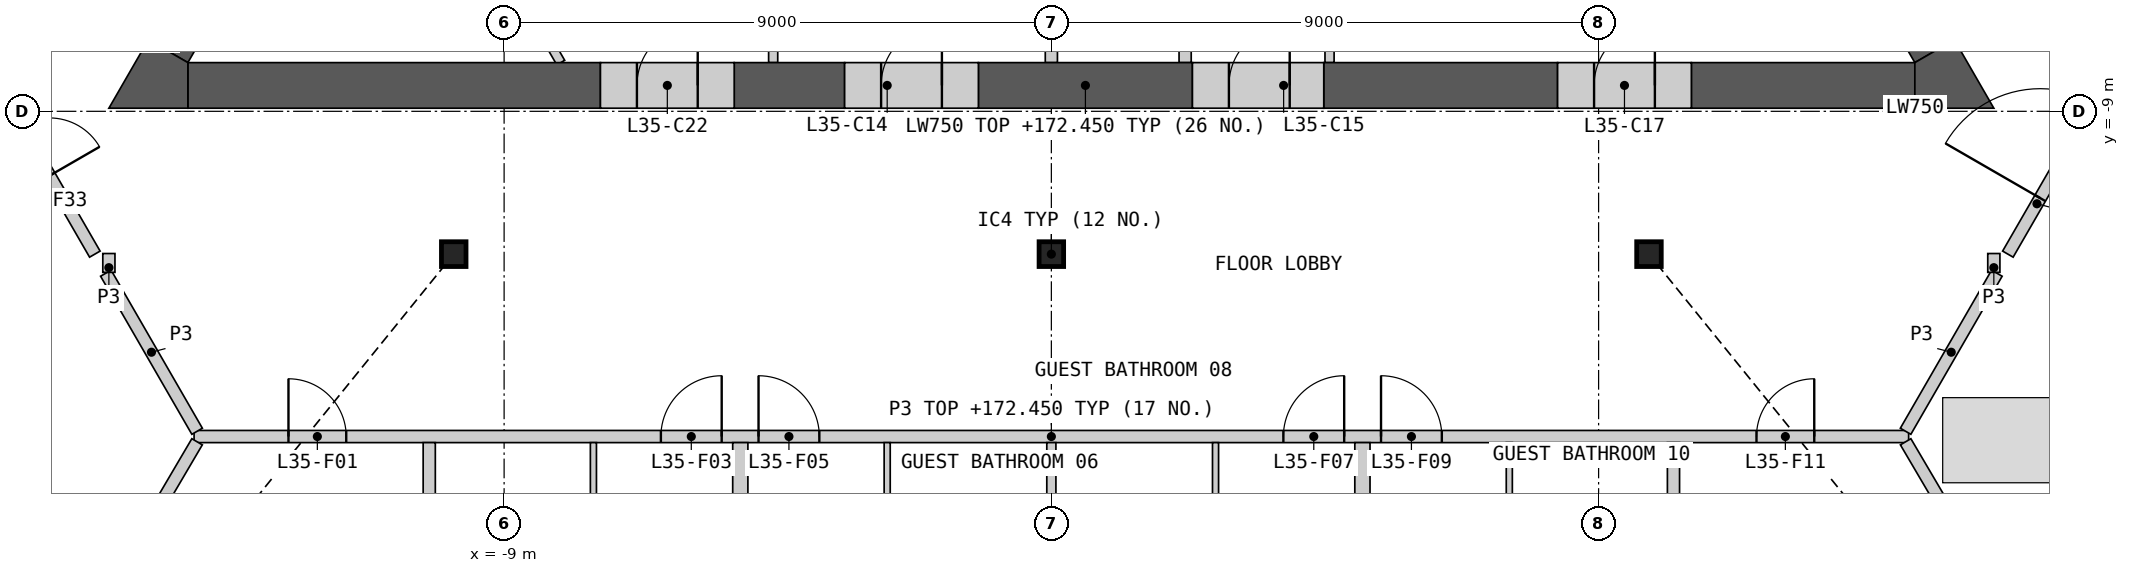
"""IFC4 building model, lengths in metres.
Left out: names, types, materials, properties, quantities, classifications, styles, units other than length and angle.
Written with IfcOpenShell. Run it as: python <this file> out.ifc"""

import sys

from ifc_helpers import new_model, si_unit, direction, frame, frame_2d, origin, origin_2d, place, context, subcontext, project, spatial, polyline, rectangle, i_section, outline, extrude, element, fill, save


model = new_model("IFC4")
c1 = context("Model", 3, precision=1e-05, world=origin(), true_north=direction((0.0, 1.0)))
c2 = subcontext(c1, "Body", "Model", "MODEL_VIEW")
j1 = project(units=[si_unit("LENGTHUNIT", "METRE"), si_unit("PLANEANGLEUNIT", "RADIAN")], contexts=[c1])
p1 = place(None, origin())
s1 = spatial("IfcSite", under=j1, at=p1, CompositionType="ELEMENT")
p2 = place(p1, origin())
s2 = spatial("IfcBuilding", under=s1, at=p2, CompositionType="ELEMENT")
p3 = place(p2, frame((0.0, 0.0, 169.2)))
s3 = spatial("IfcBuildingStorey", under=s2, at=p3, CompositionType="ELEMENT", Elevation=169.2)
for number, where, z_axis, x_axis in (
    (1, (-9.828, -11.349, 0.0), (0.0, 0.0, 1.0), (1.0, 0.0, 0.0)),
    (2, (0.0, -11.349, 0.0), (0.0, 0.0, 1.0), (1.0, 0.0, 0.0)),
    (3, (9.828, -11.349, 0.0), (0.0, 0.0, 1.0), (1.0, 0.0, 0.0)),
):
    element("IfcColumn", number, at=place(p3, frame(where, z_axis=z_axis, x_axis=x_axis)), inside=s3, PredefinedType="COLUMN", context=c2, shape_type="SweptSolid", body=[
        extrude(i_section(OverallWidth=0.404, OverallDepth=0.407, WebThickness=0.027, FlangeThickness=0.044, at=origin_2d()), origin(), (0.0, 0.0, 1.0), 3.6),
    ])
for number, where, z_axis, x_axis in (
    (4, (0.0, -6.906, 0.0), (0.0, 0.0, 1.0), (0.0, -1.0, 0.0)),
    (5, (2.2, -6.906, 0.0), (0.0, 0.0, 1.0), (0.0, -1.0, 0.0)),
):
    element("IfcWall", number, at=place(p3, frame(where, z_axis=z_axis, x_axis=x_axis)), inside=s3, PredefinedType="SHEAR", context=c2, shape_type="SweptSolid", body=[
        extrude(rectangle(XDim=1.293, YDim=0.2, at=frame_2d((0.646, 0.0))), origin(), (0.0, 0.0, 1.0), 3.25),
    ])
for number, where, z_axis, x_axis in (
    (6, (4.575, -6.906, 0.0), (0.0, 0.0, 1.0), (0.0, -1.0, 0.0)),
    (7, (-4.575, -6.906, 0.0), (0.0, 0.0, 1.0), (0.0, -1.0, 0.0)),
):
    element("IfcWall", number, at=place(p3, frame(where, z_axis=z_axis, x_axis=x_axis)), inside=s3, PredefinedType="PARTITIONING", context=c2, shape_type="SweptSolid", body=[
        extrude(rectangle(XDim=1.293, YDim=0.15, at=frame_2d((0.646, 0.0))), origin(), (0.0, 0.0, 1.0), 3.25),
    ])
p4 = place(p3, frame((-8.83, -6.881, 0.0), z_axis=(0.0, 0.0, 1.0), x_axis=(0.500037110984, -0.866003976688, 0.0)))
e8 = element("IfcWall", 8, at=p4, inside=s3, PredefinedType="PARTITIONING", context=c2, shape_type="SweptSolid", body=[
    extrude(rectangle(XDim=1.522, YDim=0.15, at=frame_2d((0.761, 0.0))), origin(), (0.0, 0.0, 1.0), 3.25),
])
p5 = place(p3, frame((-14.201, -8.574, 0.0), z_axis=(0.0, 0.0, 1.0), x_axis=(1.0, 0.0, 0.0)))
e9 = element("IfcWall", 9, at=p5, inside=s3, PredefinedType="SHEAR", context=c2, shape_type="SweptSolid", body=[
    extrude(rectangle(XDim=6.785, YDim=0.75, at=frame_2d((3.393, 0.0))), origin(), (0.0, 0.0, 1.0), 3.25),
])
p6 = place(p3, frame((4.48, -8.574, 0.0), z_axis=(0.0, 0.0, 1.0), x_axis=(1.0, 0.0, 0.0)))
e10 = element("IfcWall", 10, at=p6, inside=s3, PredefinedType="SHEAR", context=c2, shape_type="SweptSolid", body=[
    extrude(rectangle(XDim=3.845, YDim=0.75, at=frame_2d((1.923, 0.0))), origin(), (0.0, 0.0, 1.0), 3.25),
])
p7 = place(p3, frame((10.525, -8.574, 0.0), z_axis=(0.0, 0.0, 1.0), x_axis=(1.0, 0.0, 0.0)))
e11 = element("IfcWall", 11, at=p7, inside=s3, PredefinedType="SHEAR", context=c2, shape_type="SweptSolid", body=[
    extrude(rectangle(XDim=3.676, YDim=0.75, at=frame_2d((1.838, 0.0))), origin(), (0.0, 0.0, 1.0), 3.25),
])
p8 = place(p3, frame((-1.2, -8.574, 0.0), z_axis=(0.0, 0.0, 1.0), x_axis=(1.0, 0.0, 0.0)))
e12 = element("IfcWall", 12, at=p8, inside=s3, PredefinedType="SHEAR", context=c2, shape_type="SweptSolid", body=[
    extrude(rectangle(XDim=3.52, YDim=0.75, at=frame_2d((1.76, 0.0))), origin(), (0.0, 0.0, 1.0), 3.25),
])
p9 = place(p3, frame((-5.216, -8.574, 0.0), z_axis=(0.0, 0.0, 1.0), x_axis=(1.0, 0.0, 0.0)))
e13 = element("IfcWall", 13, at=p9, inside=s3, PredefinedType="SHEAR", context=c2, shape_type="SweptSolid", body=[
    extrude(rectangle(XDim=1.816, YDim=0.75, at=frame_2d((0.908, 0.0))), origin(), (0.0, 0.0, 1.0), 3.25),
])
p10 = place(p3, frame((14.526, -8.011, 0.0), z_axis=(0.0, 0.0, 1.0), x_axis=(-0.499994855372, 0.866028374016, 0.0)))
e14 = element("IfcWall", 14, at=p10, inside=s3, PredefinedType="SHEAR", context=c2, shape_type="SweptSolid", body=[
    extrude(rectangle(XDim=14.301, YDim=0.75, at=frame_2d((7.15, 0.0))), origin(), (0.0, 0.0, 1.0), 3.25),
])
p11 = place(p3, frame((-13.564, -6.346, 0.0), z_axis=(0.0, 0.0, 1.0), x_axis=(-0.499989888488, -0.86603124159, 0.0)))
e15 = element("IfcWall", 15, at=p11, inside=s3, PredefinedType="SHEAR", context=c2, shape_type="SweptSolid", body=[
    extrude(rectangle(XDim=1.923, YDim=0.75, at=frame_2d((0.961, 0.0))), origin(), (0.0, 0.0, 1.0), 3.25),
])
p12 = place(p3, origin())
e16 = element("IfcWall", 16, at=p12, inside=s3, PredefinedType="SHEAR", context=c2, shape_type="SweptSolid", body=[
    extrude(outline(polyline([(14.201, -8.949), (14.201, -8.199), (14.851, -7.824), (15.5, -8.949), (14.201, -8.949)])), origin(), (0.0, 0.0, 1.0), 3.25),
])
p13 = place(p3, origin())
e17 = element("IfcWall", 17, at=p13, inside=s3, PredefinedType="SHEAR", context=c2, shape_type="SweptSolid", body=[
    extrude(outline(polyline([(-14.851, -7.824), (-14.201, -8.199), (-14.201, -8.949), (-15.5, -8.949), (-14.851, -7.824)])), origin(), (0.0, 0.0, 1.0), 3.25),
])
p14 = place(p3, frame((-3.4, -8.574, 0.0), z_axis=(0.0, 0.0, 1.0), x_axis=(1.0, 0.0, 0.0)))
e18 = element("IfcWall", 18, at=p14, inside=s3, PredefinedType="SHEAR", context=c2, shape_type="SweptSolid", body=[
    extrude(rectangle(XDim=2.2, YDim=0.75, at=frame_2d((1.1, 0.0))), origin(), (0.0, 0.0, 1.0), 3.25),
])
p15 = place(p14, frame((0.6, 0.0, 0.0)))
e19 = element("IfcOpeningElement", 19, at=p15, cuts=e18, PredefinedType="OPENING", context=c2, shape_type="SweptSolid", body=[
    extrude(rectangle(XDim=1.0, YDim=2.1, at=frame_2d((0.5, 1.05))), frame((0.0, 0.385, 0.0), z_axis=(0.0, -1.0, 0.0), x_axis=(1.0, 0.0, 0.0)), (0.0, 0.0, 1.0), 0.77),
])
p16 = place(p3, frame((2.32, -8.574, 0.0), z_axis=(0.0, 0.0, 1.0), x_axis=(1.0, 0.0, 0.0)))
e20 = element("IfcWall", 20, at=p16, inside=s3, PredefinedType="SHEAR", context=c2, shape_type="SweptSolid", body=[
    extrude(rectangle(XDim=2.16, YDim=0.75, at=frame_2d((1.08, 0.0))), origin(), (0.0, 0.0, 1.0), 3.25),
])
p17 = place(p16, frame((0.6, 0.0, 0.0)))
e21 = element("IfcOpeningElement", 21, at=p17, cuts=e20, PredefinedType="OPENING", context=c2, shape_type="SweptSolid", body=[
    extrude(rectangle(XDim=1.0, YDim=2.1, at=frame_2d((0.5, 1.05))), frame((0.0, 0.385, 0.0), z_axis=(0.0, -1.0, 0.0), x_axis=(1.0, 0.0, 0.0)), (0.0, 0.0, 1.0), 0.77),
])
p18 = place(p3, frame((8.325, -8.574, 0.0), z_axis=(0.0, 0.0, 1.0), x_axis=(1.0, 0.0, 0.0)))
e22 = element("IfcWall", 22, at=p18, inside=s3, PredefinedType="SHEAR", context=c2, shape_type="SweptSolid", body=[
    extrude(rectangle(XDim=2.2, YDim=0.75, at=frame_2d((1.1, 0.0))), origin(), (0.0, 0.0, 1.0), 3.25),
])
p19 = place(p18, frame((0.6, 0.0, 0.0)))
e23 = element("IfcOpeningElement", 23, at=p19, cuts=e22, PredefinedType="OPENING", context=c2, shape_type="SweptSolid", body=[
    extrude(rectangle(XDim=1.0, YDim=2.1, at=frame_2d((0.5, 1.05))), frame((0.0, 0.385, 0.0), z_axis=(0.0, -1.0, 0.0), x_axis=(1.0, 0.0, 0.0)), (0.0, 0.0, 1.0), 0.77),
])
p20 = place(p3, frame((-7.416, -8.574, 0.0), z_axis=(0.0, 0.0, 1.0), x_axis=(1.0, 0.0, 0.0)))
e24 = element("IfcWall", 24, at=p20, inside=s3, PredefinedType="SHEAR", context=c2, shape_type="SweptSolid", body=[
    extrude(rectangle(XDim=2.2, YDim=0.75, at=frame_2d((1.1, 0.0))), origin(), (0.0, 0.0, 1.0), 3.25),
])
p21 = place(p20, frame((0.6, 0.0, 0.0)))
e25 = element("IfcOpeningElement", 25, at=p21, cuts=e24, PredefinedType="OPENING", context=c2, shape_type="SweptSolid", body=[
    extrude(rectangle(XDim=1.0, YDim=2.1, at=frame_2d((0.5, 1.05))), frame((0.0, 0.385, 0.0), z_axis=(0.0, -1.0, 0.0), x_axis=(1.0, 0.0, 0.0)), (0.0, 0.0, 1.0), 0.77),
])
p22 = place(p3, frame((-14.099, -14.349, 0.0), z_axis=(0.0, 0.0, 1.0), x_axis=(1.0, 0.0, 0.0)))
e26 = element("IfcWall", 26, at=p22, inside=s3, PredefinedType="PARTITIONING", context=c2, shape_type="SweptSolid", body=[
    extrude(rectangle(XDim=28.198, YDim=0.2, at=frame_2d((14.099, 0.0))), origin(), (0.0, 0.0, 1.0), 3.25),
])
p23 = place(p22, frame((1.552, 0.0, 0.0)))
e27 = element("IfcOpeningElement", 27, at=p23, cuts=e26, PredefinedType="OPENING", context=c2, shape_type="SweptSolid", body=[
    extrude(rectangle(XDim=0.95, YDim=2.1, at=frame_2d((0.475, 1.05))), frame((0.0, 0.11, 0.0), z_axis=(0.0, -1.0, 0.0), x_axis=(1.0, 0.0, 0.0)), (0.0, 0.0, 1.0), 0.22),
])
p24 = place(p22, frame((7.677, 0.0, 0.0)))
e28 = element("IfcOpeningElement", 28, at=p24, cuts=e26, PredefinedType="OPENING", context=c2, shape_type="SweptSolid", body=[
    extrude(rectangle(XDim=1.0, YDim=2.1, at=frame_2d((0.5, 1.05))), frame((0.0, 0.11, 0.0), z_axis=(0.0, -1.0, 0.0), x_axis=(1.0, 0.0, 0.0)), (0.0, 0.0, 1.0), 0.22),
])
p25 = place(p22, frame((9.283, 0.0, 0.0)))
e29 = element("IfcOpeningElement", 29, at=p25, cuts=e26, PredefinedType="OPENING", context=c2, shape_type="SweptSolid", body=[
    extrude(rectangle(XDim=1.0, YDim=2.1, at=frame_2d((0.5, 1.05))), frame((0.0, 0.11, 0.0), z_axis=(0.0, -1.0, 0.0), x_axis=(1.0, 0.0, 0.0)), (0.0, 0.0, 1.0), 0.22),
])
p26 = place(p22, frame((17.915, 0.0, 0.0)))
e30 = element("IfcOpeningElement", 30, at=p26, cuts=e26, PredefinedType="OPENING", context=c2, shape_type="SweptSolid", body=[
    extrude(rectangle(XDim=1.0, YDim=2.1, at=frame_2d((0.5, 1.05))), frame((0.0, 0.11, 0.0), z_axis=(0.0, -1.0, 0.0), x_axis=(1.0, 0.0, 0.0)), (0.0, 0.0, 1.0), 0.22),
])
p27 = place(p22, frame((19.521, 0.0, 0.0)))
e31 = element("IfcOpeningElement", 31, at=p27, cuts=e26, PredefinedType="OPENING", context=c2, shape_type="SweptSolid", body=[
    extrude(rectangle(XDim=1.0, YDim=2.1, at=frame_2d((0.5, 1.05))), frame((0.0, 0.11, 0.0), z_axis=(0.0, -1.0, 0.0), x_axis=(1.0, 0.0, 0.0)), (0.0, 0.0, 1.0), 0.22),
])
p28 = place(p22, frame((25.696, 0.0, 0.0)))
e32 = element("IfcOpeningElement", 32, at=p28, cuts=e26, PredefinedType="OPENING", context=c2, shape_type="SweptSolid", body=[
    extrude(rectangle(XDim=0.95, YDim=2.1, at=frame_2d((0.475, 1.05))), frame((0.0, 0.11, 0.0), z_axis=(0.0, -1.0, 0.0), x_axis=(1.0, 0.0, 0.0)), (0.0, 0.0, 1.0), 0.22),
])
p29 = place(p3, frame((-17.744, -8.035, 0.0), z_axis=(0.0, 0.0, 1.0), x_axis=(0.500007607708, 0.866021011428, 0.0)))
e33 = element("IfcWall", 33, at=p29, inside=s3, PredefinedType="PARTITIONING", context=c2, shape_type="SweptSolid", body=[
    extrude(rectangle(XDim=5.484, YDim=0.2, at=frame_2d((2.742, 0.0))), origin(), (0.0, 0.0, 1.0), 3.25),
])
p30 = place(p29, frame((0.352, 0.0, 0.0)))
e34 = element("IfcOpeningElement", 34, at=p30, cuts=e33, PredefinedType="OPENING", context=c2, shape_type="SweptSolid", body=[
    extrude(rectangle(XDim=1.1, YDim=2.1, at=frame_2d((0.55, 1.05))), frame((0.0, 0.11, 0.0), z_axis=(0.0, -1.0, 0.0), x_axis=(1.0, 0.0, 0.0)), (0.0, 0.0, 1.0), 0.22),
])
p31 = place(p3, frame((15.002, -3.286, 0.0), z_axis=(0.0, 0.0, 1.0), x_axis=(0.500007607708, -0.866021011428, 0.0)))
e35 = element("IfcWall", 35, at=p31, inside=s3, PredefinedType="PARTITIONING", context=c2, shape_type="SweptSolid", body=[
    extrude(rectangle(XDim=5.484, YDim=0.2, at=frame_2d((2.742, 0.0))), origin(), (0.0, 0.0, 1.0), 3.25),
])
p32 = place(p31, frame((4.032, 0.0, 0.0)))
e36 = element("IfcOpeningElement", 36, at=p32, cuts=e35, PredefinedType="OPENING", context=c2, shape_type="SweptSolid", body=[
    extrude(rectangle(XDim=1.1, YDim=2.1, at=frame_2d((0.55, 1.05))), frame((0.0, 0.11, 0.0), z_axis=(0.0, -1.0, 0.0), x_axis=(1.0, 0.0, 0.0)), (0.0, 0.0, 1.0), 0.22),
])
for number, where, z_axis, x_axis in (
    (37, (-5.116, -19.661, 0.0), (0.0, 0.0, 1.0), (0.0, 1.0, 0.0)),
    (38, (5.116, -19.661, 0.0), (0.0, 0.0, 1.0), (0.0, 1.0, 0.0)),
):
    element("IfcWall", number, at=place(p3, frame(where, z_axis=z_axis, x_axis=x_axis)), inside=s3, PredefinedType="PARTITIONING", context=c2, shape_type="SweptSolid", body=[
        extrude(rectangle(XDim=5.212, YDim=0.25, at=frame_2d((2.606, 0.0))), origin(), (0.0, 0.0, 1.0), 2.404),
    ])
p33 = place(p3, frame((15.731, -11.349, 0.0), z_axis=(0.0, 0.0, 1.0), x_axis=(0.499961815444, 0.866047448526, 0.0)))
e39 = element("IfcWall", 39, at=p33, inside=s3, PredefinedType="PARTITIONING", context=c2, shape_type="SweptSolid", body=[
    extrude(rectangle(XDim=3.826, YDim=0.2, at=frame_2d((1.913, 0.0))), origin(), (0.0, 0.0, 1.0), 3.25),
])
p34 = place(p33, frame((1.064, 0.0, 0.0)))
e40 = element("IfcOpeningElement", 40, at=p34, cuts=e39, PredefinedType="OPENING", context=c2, shape_type="SweptSolid", body=[
    extrude(rectangle(XDim=1.8, YDim=2.1, at=frame_2d((0.9, 1.05))), frame((0.0, 0.11, 0.0), z_axis=(0.0, -1.0, 0.0), x_axis=(1.0, 0.0, 0.0)), (0.0, 0.0, 1.0), 0.22),
])
p35 = place(p3, frame((-17.644, -8.035, 0.0), z_axis=(0.0, 0.0, 1.0), x_axis=(0.499961815444, -0.866047448526, 0.0)))
e41 = element("IfcWall", 41, at=p35, inside=s3, PredefinedType="PARTITIONING", context=c2, shape_type="SweptSolid", body=[
    extrude(rectangle(XDim=3.826, YDim=0.2, at=frame_2d((1.913, 0.0))), origin(), (0.0, 0.0, 1.0), 3.25),
])
p36 = place(p35, frame((1.386, 0.0, 0.0)))
e42 = element("IfcOpeningElement", 42, at=p36, cuts=e41, PredefinedType="OPENING", context=c2, shape_type="SweptSolid", body=[
    extrude(rectangle(XDim=0.95, YDim=2.1, at=frame_2d((0.475, 1.05))), frame((0.0, 0.11, 0.0), z_axis=(0.0, -1.0, 0.0), x_axis=(1.0, 0.0, 0.0)), (0.0, 0.0, 1.0), 0.22),
])
for number, where, z_axis, x_axis in (
    (43, (14.049, -14.262, 0.0), (0.0, 0.0, 1.0), (0.5, 0.866, 0.0)),
    (44, (-15.55, -11.662, 0.0), (0.0, 0.0, 1.0), (0.5, -0.866, 0.0)),
):
    element("IfcWall", number, at=place(p3, frame(where, z_axis=z_axis, x_axis=x_axis)), inside=s3, PredefinedType="PARTITIONING", context=c2, shape_type="SweptSolid", body=[
        extrude(rectangle(XDim=3.002, YDim=0.2, at=frame_2d((1.501, 0.0))), origin(), (0.0, 0.0, 1.0), 3.25),
    ])
for number, where, z_axis, x_axis in (
    (45, (15.5, -11.649, 0.0), (0.0, 0.0, 1.0), (0.0, 1.0, 0.0)),
    (46, (-15.5, -11.649, 0.0), (0.0, 0.0, 1.0), (0.0, 1.0, 0.0)),
):
    element("IfcWall", number, at=place(p3, frame(where, z_axis=z_axis, x_axis=x_axis)), inside=s3, PredefinedType="PARTITIONING", context=c2, shape_type="SweptSolid", body=[
        extrude(rectangle(XDim=0.31, YDim=0.2, at=frame_2d((0.155, 0.0))), origin(), (0.0, 0.0, 1.0), 3.25),
    ])
p37 = place(p3, frame((14.05, -14.435, 0.0), z_axis=(0.0, 0.0, 1.0), x_axis=(0.50691019554, -0.861998871031, 0.0)))
e47 = element("IfcWall", 47, at=p37, inside=s3, PredefinedType="PARTITIONING", context=c2, shape_type="SweptSolid", body=[
    extrude(rectangle(XDim=12.229, YDim=0.2, at=frame_2d((6.115, 0.0))), origin(), (0.0, 0.0, 1.0), 2.404),
])
p38 = place(p3, frame((-20.046, -24.632, 0.0), z_axis=(0.0, 0.0, 1.0), x_axis=(0.50691549935, 0.86199575203, 0.0)))
e48 = element("IfcWall", 48, at=p38, inside=s3, PredefinedType="PARTITIONING", context=c2, shape_type="SweptSolid", body=[
    extrude(rectangle(XDim=11.83, YDim=0.2, at=frame_2d((5.915, 0.0))), origin(), (0.0, 0.0, 1.0), 2.404),
])
p39 = place(p3, frame((-22.363, -7.862, 0.0), z_axis=(0.0, 0.0, 1.0), x_axis=(0.500009728207, -0.866019787128, 0.0)))
e49 = element("IfcWall", 49, at=p39, inside=s3, PredefinedType="PARTITIONING", context=c2, shape_type="SweptSolid", body=[
    extrude(rectangle(XDim=11.967, YDim=0.2, at=frame_2d((5.983, 0.0))), origin(), (0.0, 0.0, 1.0), 2.404),
])
p40 = place(p39, frame((5.658, 0.0, 0.0)))
e50 = element("IfcOpeningElement", 50, at=p40, cuts=e49, PredefinedType="OPENING", context=c2, shape_type="SweptSolid", body=[
    extrude(rectangle(XDim=0.95, YDim=2.1, at=frame_2d((0.475, 1.05))), frame((0.0, 0.11, 0.0), z_axis=(0.0, -1.0, 0.0), x_axis=(1.0, 0.0, 0.0)), (0.0, 0.0, 1.0), 0.22),
])
for number, where, z_axis, x_axis in (
    (51, (-10.231, -24.312, 0.0), (0.0, 0.0, 1.0), (0.0, 1.0, 0.0)),
    (52, (10.231, -24.312, 0.0), (0.0, 0.0, 1.0), (0.0, 1.0, 0.0)),
):
    element("IfcWall", number, at=place(p3, frame(where, z_axis=z_axis, x_axis=x_axis)), inside=s3, PredefinedType="PARTITIONING", context=c2, shape_type="SweptSolid", body=[
        extrude(rectangle(XDim=9.863, YDim=0.2, at=frame_2d((4.931, 0.0))), origin(), (0.0, 0.0, 1.0), 2.404),
    ])
p41 = place(p3, frame((0.0, -16.899, 0.0), z_axis=(0.0, 0.0, 1.0), x_axis=(0.0, 1.0, 0.0)))
e53 = element("IfcWall", 53, at=p41, inside=s3, PredefinedType="PLUMBINGWALL", context=c2, shape_type="SweptSolid", body=[
    extrude(rectangle(XDim=2.45, YDim=0.15, at=frame_2d((1.225, 0.0))), origin(), (0.0, 0.0, 1.0), 2.404),
])
for number, where, z_axis, x_axis in (
    (54, (-7.531, -16.899, 0.0), (0.0, 0.0, 1.0), (0.0, 1.0, 0.0)),
    (55, (-2.7, -16.899, 0.0), (0.0, 0.0, 1.0), (0.0, 1.0, 0.0)),
    (56, (2.7, -16.899, 0.0), (0.0, 0.0, 1.0), (0.0, 1.0, 0.0)),
    (57, (7.531, -16.899, 0.0), (0.0, 0.0, 1.0), (0.0, 1.0, 0.0)),
):
    element("IfcWall", number, at=place(p3, frame(where, z_axis=z_axis, x_axis=x_axis)), inside=s3, PredefinedType="PARTITIONING", context=c2, shape_type="SweptSolid", body=[
        extrude(rectangle(XDim=2.45, YDim=0.1, at=frame_2d((1.225, 0.0))), origin(), (0.0, 0.0, 1.0), 2.404),
    ])
p42 = place(p15, origin())
e58 = element("IfcDoor", 58, at=p42, inside=s3, OperationType="SINGLE_SWING_RIGHT", PredefinedType="DOOR", context=c2, shape_type="SweptSolid", body=[
    extrude(rectangle(XDim=1.0, YDim=2.1, at=frame_2d((0.5, 1.05))), frame((0.0, 0.13, 0.0), z_axis=(0.0, -1.0, 0.0), x_axis=(1.0, 0.0, 0.0)), (0.0, 0.0, 1.0), 0.05),
])
fill(e19, e58)
p43 = place(p17, origin())
e59 = element("IfcDoor", 59, at=p43, inside=s3, OperationType="SINGLE_SWING_RIGHT", PredefinedType="DOOR", context=c2, shape_type="SweptSolid", body=[
    extrude(rectangle(XDim=1.0, YDim=2.1, at=frame_2d((0.5, 1.05))), frame((0.0, 0.13, 0.0), z_axis=(0.0, -1.0, 0.0), x_axis=(1.0, 0.0, 0.0)), (0.0, 0.0, 1.0), 0.05),
])
fill(e21, e59)
p44 = place(p19, origin())
e60 = element("IfcDoor", 60, at=p44, inside=s3, OperationType="SINGLE_SWING_RIGHT", PredefinedType="DOOR", context=c2, shape_type="SweptSolid", body=[
    extrude(rectangle(XDim=1.0, YDim=2.1, at=frame_2d((0.5, 1.05))), frame((0.0, 0.13, 0.0), z_axis=(0.0, -1.0, 0.0), x_axis=(1.0, 0.0, 0.0)), (0.0, 0.0, 1.0), 0.05),
])
fill(e23, e60)
p45 = place(p21, origin())
e61 = element("IfcDoor", 61, at=p45, inside=s3, OperationType="SINGLE_SWING_RIGHT", PredefinedType="DOOR", context=c2, shape_type="SweptSolid", body=[
    extrude(rectangle(XDim=1.0, YDim=2.1, at=frame_2d((0.5, 1.05))), frame((0.0, 0.13, 0.0), z_axis=(0.0, -1.0, 0.0), x_axis=(1.0, 0.0, 0.0)), (0.0, 0.0, 1.0), 0.05),
])
fill(e25, e61)
p46 = place(p23, origin())
e62 = element("IfcDoor", 62, at=p46, inside=s3, OperationType="SINGLE_SWING_LEFT", PredefinedType="DOOR", context=c2, shape_type="SweptSolid", body=[
    extrude(rectangle(XDim=0.95, YDim=2.1, at=frame_2d((0.475, 1.05))), frame((0.0, 0.025, 0.0), z_axis=(0.0, -1.0, 0.0), x_axis=(1.0, 0.0, 0.0)), (0.0, 0.0, 1.0), 0.05),
])
fill(e27, e62)
p47 = place(p24, origin())
e63 = element("IfcDoor", 63, at=p47, inside=s3, OperationType="SINGLE_SWING_RIGHT", PredefinedType="DOOR", context=c2, shape_type="SweptSolid", body=[
    extrude(rectangle(XDim=1.0, YDim=2.1, at=frame_2d((0.5, 1.05))), frame((0.0, 0.025, 0.0), z_axis=(0.0, -1.0, 0.0), x_axis=(1.0, 0.0, 0.0)), (0.0, 0.0, 1.0), 0.05),
])
fill(e28, e63)
p48 = place(p25, origin())
e64 = element("IfcDoor", 64, at=p48, inside=s3, OperationType="SINGLE_SWING_LEFT", PredefinedType="DOOR", context=c2, shape_type="SweptSolid", body=[
    extrude(rectangle(XDim=1.0, YDim=2.1, at=frame_2d((0.5, 1.05))), frame((0.0, 0.025, 0.0), z_axis=(0.0, -1.0, 0.0), x_axis=(1.0, 0.0, 0.0)), (0.0, 0.0, 1.0), 0.05),
])
fill(e29, e64)
p49 = place(p26, origin())
e65 = element("IfcDoor", 65, at=p49, inside=s3, OperationType="SINGLE_SWING_RIGHT", PredefinedType="DOOR", context=c2, shape_type="SweptSolid", body=[
    extrude(rectangle(XDim=1.0, YDim=2.1, at=frame_2d((0.5, 1.05))), frame((0.0, 0.025, 0.0), z_axis=(0.0, -1.0, 0.0), x_axis=(1.0, 0.0, 0.0)), (0.0, 0.0, 1.0), 0.05),
])
fill(e30, e65)
p50 = place(p27, origin())
e66 = element("IfcDoor", 66, at=p50, inside=s3, OperationType="SINGLE_SWING_LEFT", PredefinedType="DOOR", context=c2, shape_type="SweptSolid", body=[
    extrude(rectangle(XDim=1.0, YDim=2.1, at=frame_2d((0.5, 1.05))), frame((0.0, 0.025, 0.0), z_axis=(0.0, -1.0, 0.0), x_axis=(1.0, 0.0, 0.0)), (0.0, 0.0, 1.0), 0.05),
])
fill(e31, e66)
p51 = place(p28, origin())
e67 = element("IfcDoor", 67, at=p51, inside=s3, OperationType="SINGLE_SWING_RIGHT", PredefinedType="DOOR", context=c2, shape_type="SweptSolid", body=[
    extrude(rectangle(XDim=0.95, YDim=2.1, at=frame_2d((0.475, 1.05))), frame((0.0, 0.025, 0.0), z_axis=(0.0, -1.0, 0.0), x_axis=(1.0, 0.0, 0.0)), (0.0, 0.0, 1.0), 0.05),
])
fill(e32, e67)
p52 = place(p34, origin())
e68 = element("IfcDoor", 68, at=p52, inside=s3, OperationType="DOUBLE_DOOR_SINGLE_SWING", PredefinedType="DOOR", context=c2, shape_type="SweptSolid", body=[
    extrude(rectangle(XDim=1.8, YDim=2.1, at=frame_2d((0.9, 1.05))), frame((0.0, 0.025, 0.0), z_axis=(0.0, -1.0, 0.0), x_axis=(1.0, 0.0, 0.0)), (0.0, 0.0, 1.0), 0.05),
])
fill(e40, e68)
save(model, sys.argv[1])
